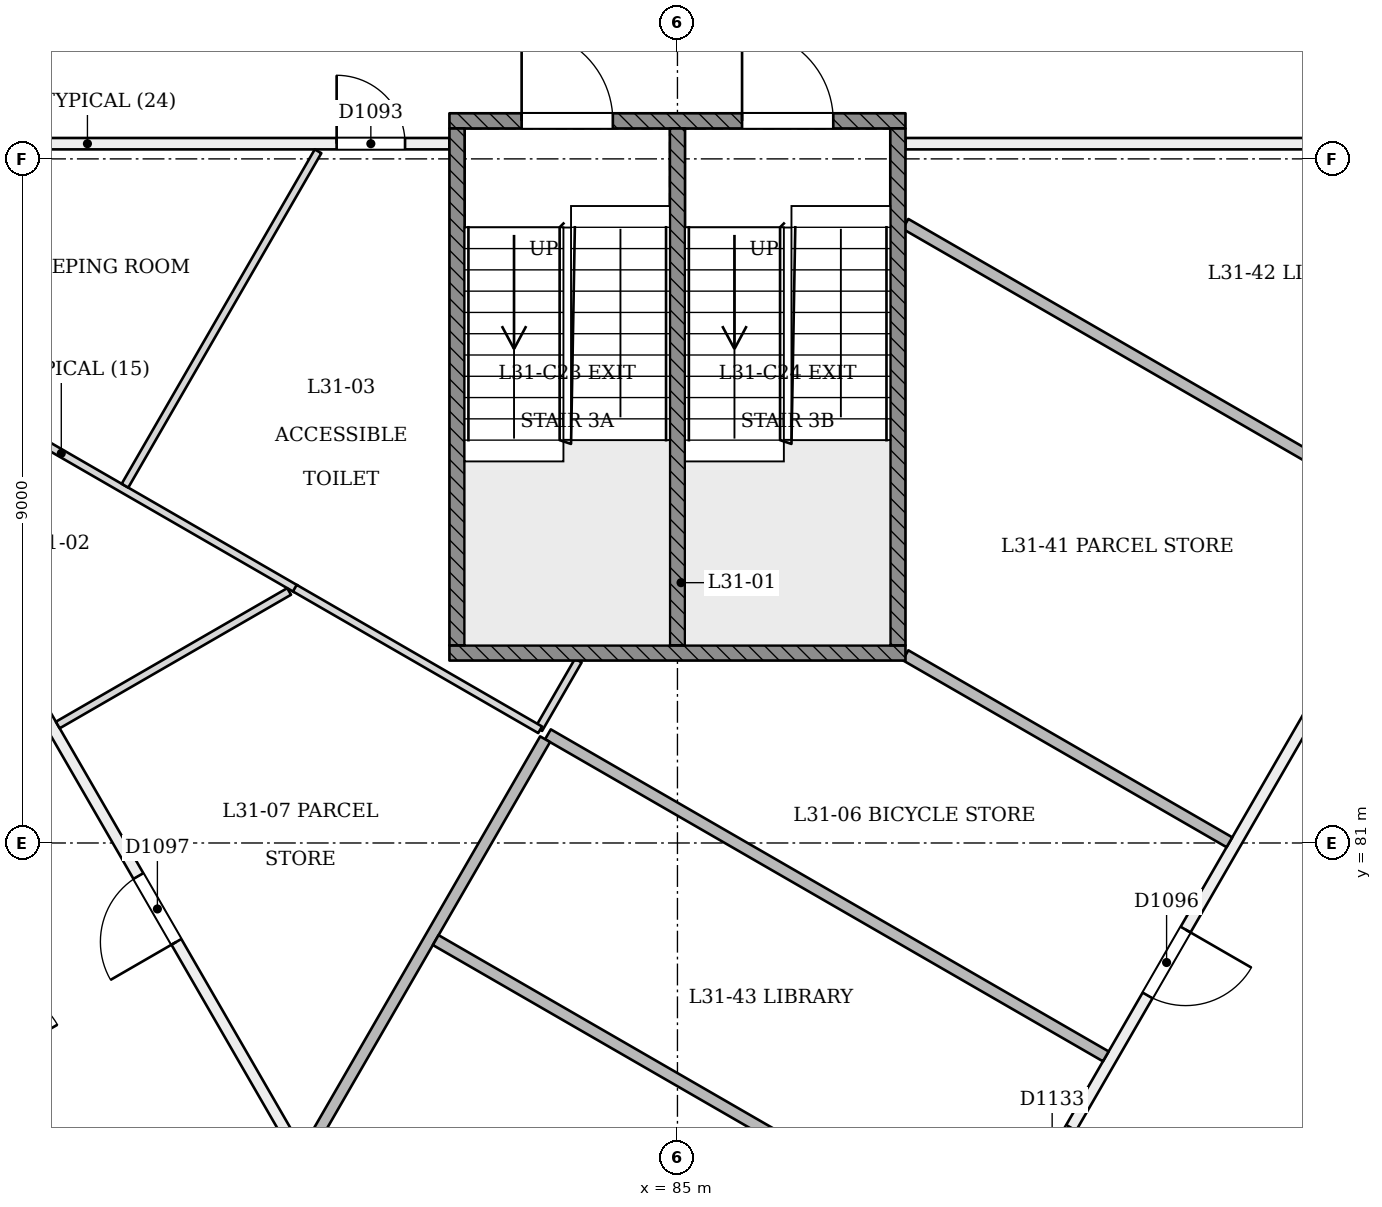
"""IFC4 building model, lengths in metres.
Left out: names, types, materials, properties, quantities, classifications, styles, units other than length and angle.
Written with IfcOpenShell. Run it as: python <this file> out.ifc"""

import sys

from ifc_helpers import new_model, si_unit, direction, frame, frame_2d, origin, place, context, subcontext, project, spatial, rectangle, extrude, element, fill, save


model = new_model("IFC4")
c1 = context("Model", 3, precision=1e-05, world=origin(), true_north=direction((0.0, 1.0)))
c2 = subcontext(c1, "Body", "Model", "MODEL_VIEW")
j1 = project(units=[si_unit("LENGTHUNIT", "METRE"), si_unit("PLANEANGLEUNIT", "RADIAN")], contexts=[c1])
p1 = place(None, origin())
s1 = spatial("IfcSite", under=j1, at=p1, CompositionType="ELEMENT")
p2 = place(p1, origin())
s2 = spatial("IfcBuilding", under=s1, at=p2, CompositionType="ELEMENT")
p3 = place(p2, frame((0.0, 0.0, 124.2)))
s3 = spatial("IfcBuildingStorey", under=s2, at=p3, CompositionType="ELEMENT", Elevation=124.2)
p4 = place(p3, frame((72.475, 90.2, 0.0), z_axis=(0.0, 0.0, 1.0), x_axis=(1.0, 0.0, 0.0)))
e1 = element("IfcWall", 1, at=p4, inside=s3, PredefinedType="PARTITIONING", context=c2, shape_type="SweptSolid", body=[
    extrude(rectangle(XDim=9.525, YDim=0.15, at=frame_2d((4.762, 0.0))), origin(), (0.0, 0.0, 1.0), 3.15),
])
p5 = place(p4, frame((8.041, 0.0, 0.0)))
e2 = element("IfcOpeningElement", 2, at=p5, cuts=e1, PredefinedType="OPENING", context=c2, shape_type="SweptSolid", body=[
    extrude(rectangle(XDim=0.9, YDim=2.1, at=frame_2d((0.45, 1.05))), frame((0.0, 0.085, 0.0), z_axis=(0.0, -1.0, 0.0), x_axis=(1.0, 0.0, 0.0)), (0.0, 0.0, 1.0), 0.171),
])
p6 = place(p3, frame((85.0, 68.281, 0.0), z_axis=(0.0, 0.0, 1.0), x_axis=(-0.49999744999, 0.866026876029, 0.0)))
e3 = element("IfcWall", 3, at=p6, inside=s3, PredefinedType="PARTITIONING", context=c2, shape_type="SweptSolid", body=[
    extrude(rectangle(XDim=25.309, YDim=0.15, at=frame_2d((12.655, 0.0))), origin(), (0.0, 0.0, 1.0), 3.15),
])
p7 = place(p6, frame((18.107, 0.0, 0.0)))
e4 = element("IfcOpeningElement", 4, at=p7, cuts=e3, PredefinedType="OPENING", context=c2, shape_type="SweptSolid", body=[
    extrude(rectangle(XDim=0.9, YDim=2.1, at=frame_2d((0.45, 1.05))), frame((0.0, 0.085, 0.0), z_axis=(0.0, -1.0, 0.0), x_axis=(1.0, 0.0, 0.0)), (0.0, 0.0, 1.0), 0.171),
])
p8 = place(p6, frame((22.843, 0.0, 0.0)))
e5 = element("IfcOpeningElement", 5, at=p8, cuts=e3, PredefinedType="OPENING", context=c2, shape_type="SweptSolid", body=[
    extrude(rectangle(XDim=1.0, YDim=2.1, at=frame_2d((0.5, 1.05))), frame((0.0, 0.085, 0.0), z_axis=(0.0, -1.0, 0.0), x_axis=(1.0, 0.0, 0.0)), (0.0, 0.0, 1.0), 0.171),
])
p9 = place(p6, frame((3.844, 0.0, 0.0)))
e6 = element("IfcOpeningElement", 6, at=p9, cuts=e3, PredefinedType="OPENING", context=c2, shape_type="SweptSolid", body=[
    extrude(rectangle(XDim=1.0, YDim=2.1, at=frame_2d((0.5, 1.05))), frame((0.0, 0.085, 0.0), z_axis=(0.0, -1.0, 0.0), x_axis=(1.0, 0.0, 0.0)), (0.0, 0.0, 1.0), 0.171),
])
p10 = place(p6, frame((13.184, 0.0, 0.0)))
e7 = element("IfcOpeningElement", 7, at=p10, cuts=e3, PredefinedType="OPENING", context=c2, shape_type="SweptSolid", body=[
    extrude(rectangle(XDim=1.0, YDim=2.1, at=frame_2d((0.5, 1.05))), frame((0.0, 0.085, 0.0), z_axis=(0.0, -1.0, 0.0), x_axis=(1.0, 0.0, 0.0)), (0.0, 0.0, 1.0), 0.171),
])
p11 = place(p3, frame((97.655, 90.2, 0.0), z_axis=(0.0, 0.0, 1.0), x_axis=(-0.5000058613, -0.866022019735, 0.0)))
e8 = element("IfcWall", 8, at=p11, inside=s3, PredefinedType="PARTITIONING", context=c2, shape_type="SweptSolid", body=[
    extrude(rectangle(XDim=25.179, YDim=0.15, at=frame_2d((12.59, 0.0))), origin(), (0.0, 0.0, 1.0), 3.15),
])
p12 = place(p11, frame((11.939, 0.0, 0.0)))
e9 = element("IfcOpeningElement", 9, at=p12, cuts=e8, PredefinedType="OPENING", context=c2, shape_type="SweptSolid", body=[
    extrude(rectangle(XDim=1.0, YDim=2.1, at=frame_2d((0.5, 1.05))), frame((0.0, 0.085, 0.0), z_axis=(0.0, -1.0, 0.0), x_axis=(1.0, 0.0, 0.0)), (0.0, 0.0, 1.0), 0.171),
])
p13 = place(p11, frame((7.517, 0.0, 0.0)))
e10 = element("IfcOpeningElement", 10, at=p13, cuts=e8, PredefinedType="OPENING", context=c2, shape_type="SweptSolid", body=[
    extrude(rectangle(XDim=1.0, YDim=2.1, at=frame_2d((0.5, 1.05))), frame((0.0, 0.085, 0.0), z_axis=(0.0, -1.0, 0.0), x_axis=(1.0, 0.0, 0.0)), (0.0, 0.0, 1.0), 0.171),
])
p14 = place(p11, frame((3.271, 0.0, 0.0)))
e11 = element("IfcOpeningElement", 11, at=p14, cuts=e8, PredefinedType="OPENING", context=c2, shape_type="SweptSolid", body=[
    extrude(rectangle(XDim=1.0, YDim=2.1, at=frame_2d((0.5, 1.05))), frame((0.0, 0.085, 0.0), z_axis=(0.0, -1.0, 0.0), x_axis=(1.0, 0.0, 0.0)), (0.0, 0.0, 1.0), 0.171),
])
p15 = place(p11, frame((14.95, 0.0, 0.0)))
e12 = element("IfcOpeningElement", 12, at=p15, cuts=e8, PredefinedType="OPENING", context=c2, shape_type="SweptSolid", body=[
    extrude(rectangle(XDim=1.0, YDim=2.1, at=frame_2d((0.5, 1.05))), frame((0.0, 0.085, 0.0), z_axis=(0.0, -1.0, 0.0), x_axis=(1.0, 0.0, 0.0)), (0.0, 0.0, 1.0), 0.171),
])
p16 = place(p11, frame((18.033, 0.0, 0.0)))
e13 = element("IfcOpeningElement", 13, at=p16, cuts=e8, PredefinedType="OPENING", context=c2, shape_type="SweptSolid", body=[
    extrude(rectangle(XDim=1.0, YDim=2.1, at=frame_2d((0.5, 1.05))), frame((0.0, 0.085, 0.0), z_axis=(0.0, -1.0, 0.0), x_axis=(1.0, 0.0, 0.0)), (0.0, 0.0, 1.0), 0.171),
])
p17 = place(p3, frame((64.413, 98.139, 0.0), z_axis=(0.0, 0.0, 1.0), x_axis=(0.500003831119, -0.866023191876, 0.0)))
e14 = element("IfcWall", 14, at=p17, inside=s3, PredefinedType="PARTITIONING", context=c2, shape_type="SweptSolid", body=[
    extrude(rectangle(XDim=40.758, YDim=0.15, at=frame_2d((20.379, 0.0))), origin(), (0.0, 0.0, 1.0), 2.75),
])
p18 = place(p17, frame((0.2, 0.0, 0.0)))
e15 = element("IfcOpeningElement", 15, at=p18, cuts=e14, PredefinedType="OPENING", context=c2, shape_type="SweptSolid", body=[
    extrude(rectangle(XDim=1.2, YDim=2.1, at=frame_2d((0.6, 1.05))), frame((0.0, 0.085, 0.0), z_axis=(0.0, -1.0, 0.0), x_axis=(1.0, 0.0, 0.0)), (0.0, 0.0, 1.0), 0.171),
])
p19 = place(p17, frame((3.099, 0.0, 0.0)))
e16 = element("IfcOpeningElement", 16, at=p19, cuts=e14, PredefinedType="OPENING", context=c2, shape_type="SweptSolid", body=[
    extrude(rectangle(XDim=1.0, YDim=2.1, at=frame_2d((0.5, 1.05))), frame((0.0, 0.085, 0.0), z_axis=(0.0, -1.0, 0.0), x_axis=(1.0, 0.0, 0.0)), (0.0, 0.0, 1.0), 0.171),
])
p20 = place(p17, frame((9.774, 0.0, 0.0)))
e17 = element("IfcOpeningElement", 17, at=p20, cuts=e14, PredefinedType="OPENING", context=c2, shape_type="SweptSolid", body=[
    extrude(rectangle(XDim=1.0, YDim=2.1, at=frame_2d((0.5, 1.05))), frame((0.0, 0.085, 0.0), z_axis=(0.0, -1.0, 0.0), x_axis=(1.0, 0.0, 0.0)), (0.0, 0.0, 1.0), 0.171),
])
p21 = place(p17, frame((11.984, 0.0, 0.0)))
e18 = element("IfcOpeningElement", 18, at=p21, cuts=e14, PredefinedType="OPENING", context=c2, shape_type="SweptSolid", body=[
    extrude(rectangle(XDim=1.0, YDim=2.1, at=frame_2d((0.5, 1.05))), frame((0.0, 0.085, 0.0), z_axis=(0.0, -1.0, 0.0), x_axis=(1.0, 0.0, 0.0)), (0.0, 0.0, 1.0), 0.171),
])
p22 = place(p17, frame((18.659, 0.0, 0.0)))
e19 = element("IfcOpeningElement", 19, at=p22, cuts=e14, PredefinedType="OPENING", context=c2, shape_type="SweptSolid", body=[
    extrude(rectangle(XDim=1.0, YDim=2.1, at=frame_2d((0.5, 1.05))), frame((0.0, 0.085, 0.0), z_axis=(0.0, -1.0, 0.0), x_axis=(1.0, 0.0, 0.0)), (0.0, 0.0, 1.0), 0.171),
])
p23 = place(p17, frame((22.129, 0.0, 0.0)))
e20 = element("IfcOpeningElement", 20, at=p23, cuts=e14, PredefinedType="OPENING", context=c2, shape_type="SweptSolid", body=[
    extrude(rectangle(XDim=1.0, YDim=2.1, at=frame_2d((0.5, 1.05))), frame((0.0, 0.085, 0.0), z_axis=(0.0, -1.0, 0.0), x_axis=(1.0, 0.0, 0.0)), (0.0, 0.0, 1.0), 0.171),
])
p24 = place(p17, frame((27.659, 0.0, 0.0)))
e21 = element("IfcOpeningElement", 21, at=p24, cuts=e14, PredefinedType="OPENING", context=c2, shape_type="SweptSolid", body=[
    extrude(rectangle(XDim=1.0, YDim=2.1, at=frame_2d((0.5, 1.05))), frame((0.0, 0.085, 0.0), z_axis=(0.0, -1.0, 0.0), x_axis=(1.0, 0.0, 0.0)), (0.0, 0.0, 1.0), 0.171),
])
p25 = place(p17, frame((31.129, 0.0, 0.0)))
e22 = element("IfcOpeningElement", 22, at=p25, cuts=e14, PredefinedType="OPENING", context=c2, shape_type="SweptSolid", body=[
    extrude(rectangle(XDim=1.0, YDim=2.1, at=frame_2d((0.5, 1.05))), frame((0.0, 0.085, 0.0), z_axis=(0.0, -1.0, 0.0), x_axis=(1.0, 0.0, 0.0)), (0.0, 0.0, 1.0), 0.171),
])
p26 = place(p17, frame((36.659, 0.0, 0.0)))
e23 = element("IfcOpeningElement", 23, at=p26, cuts=e14, PredefinedType="OPENING", context=c2, shape_type="SweptSolid", body=[
    extrude(rectangle(XDim=1.0, YDim=2.1, at=frame_2d((0.5, 1.05))), frame((0.0, 0.085, 0.0), z_axis=(0.0, -1.0, 0.0), x_axis=(1.0, 0.0, 0.0)), (0.0, 0.0, 1.0), 0.171),
])
p27 = place(p17, frame((39.445, 0.0, 0.0)))
e24 = element("IfcOpeningElement", 24, at=p27, cuts=e14, PredefinedType="OPENING", context=c2, shape_type="SweptSolid", body=[
    extrude(rectangle(XDim=1.0, YDim=2.1, at=frame_2d((0.5, 1.05))), frame((0.0, 0.085, 0.0), z_axis=(0.0, -1.0, 0.0), x_axis=(1.0, 0.0, 0.0)), (0.0, 0.0, 1.0), 0.171),
])
p28 = place(p3, frame((85.208, 62.842, 0.0), z_axis=(0.0, 0.0, 1.0), x_axis=(0.499999338616, 0.866025785634, 0.0)))
e25 = element("IfcWall", 25, at=p28, inside=s3, PredefinedType="PARTITIONING", context=c2, shape_type="SweptSolid", body=[
    extrude(rectangle(XDim=40.758, YDim=0.15, at=frame_2d((20.379, 0.0))), origin(), (0.0, 0.0, 1.0), 2.75),
])
p29 = place(p28, frame((0.295, 0.0, 0.0)))
e26 = element("IfcOpeningElement", 26, at=p29, cuts=e25, PredefinedType="OPENING", context=c2, shape_type="SweptSolid", body=[
    extrude(rectangle(XDim=1.2, YDim=2.1, at=frame_2d((0.6, 1.05))), frame((0.0, 0.085, 0.0), z_axis=(0.0, -1.0, 0.0), x_axis=(1.0, 0.0, 0.0)), (0.0, 0.0, 1.0), 0.171),
])
p30 = place(p28, frame((4.129, 0.0, 0.0)))
e27 = element("IfcOpeningElement", 27, at=p30, cuts=e25, PredefinedType="OPENING", context=c2, shape_type="SweptSolid", body=[
    extrude(rectangle(XDim=1.0, YDim=2.1, at=frame_2d((0.5, 1.05))), frame((0.0, 0.085, 0.0), z_axis=(0.0, -1.0, 0.0), x_axis=(1.0, 0.0, 0.0)), (0.0, 0.0, 1.0), 0.171),
])
p31 = place(p28, frame((9.659, 0.0, 0.0)))
e28 = element("IfcOpeningElement", 28, at=p31, cuts=e25, PredefinedType="OPENING", context=c2, shape_type="SweptSolid", body=[
    extrude(rectangle(XDim=1.0, YDim=2.1, at=frame_2d((0.5, 1.05))), frame((0.0, 0.085, 0.0), z_axis=(0.0, -1.0, 0.0), x_axis=(1.0, 0.0, 0.0)), (0.0, 0.0, 1.0), 0.171),
])
p32 = place(p28, frame((11.984, 0.0, 0.0)))
e29 = element("IfcOpeningElement", 29, at=p32, cuts=e25, PredefinedType="OPENING", context=c2, shape_type="SweptSolid", body=[
    extrude(rectangle(XDim=1.0, YDim=2.1, at=frame_2d((0.5, 1.05))), frame((0.0, 0.085, 0.0), z_axis=(0.0, -1.0, 0.0), x_axis=(1.0, 0.0, 0.0)), (0.0, 0.0, 1.0), 0.171),
])
p33 = place(p28, frame((18.774, 0.0, 0.0)))
e30 = element("IfcOpeningElement", 30, at=p33, cuts=e25, PredefinedType="OPENING", context=c2, shape_type="SweptSolid", body=[
    extrude(rectangle(XDim=1.0, YDim=2.1, at=frame_2d((0.5, 1.05))), frame((0.0, 0.085, 0.0), z_axis=(0.0, -1.0, 0.0), x_axis=(1.0, 0.0, 0.0)), (0.0, 0.0, 1.0), 0.171),
])
p34 = place(p28, frame((21.099, 0.0, 0.0)))
e31 = element("IfcOpeningElement", 31, at=p34, cuts=e25, PredefinedType="OPENING", context=c2, shape_type="SweptSolid", body=[
    extrude(rectangle(XDim=1.0, YDim=2.1, at=frame_2d((0.5, 1.05))), frame((0.0, 0.085, 0.0), z_axis=(0.0, -1.0, 0.0), x_axis=(1.0, 0.0, 0.0)), (0.0, 0.0, 1.0), 0.171),
])
p35 = place(p28, frame((27.659, 0.0, 0.0)))
e32 = element("IfcOpeningElement", 32, at=p35, cuts=e25, PredefinedType="OPENING", context=c2, shape_type="SweptSolid", body=[
    extrude(rectangle(XDim=1.0, YDim=2.1, at=frame_2d((0.5, 1.05))), frame((0.0, 0.085, 0.0), z_axis=(0.0, -1.0, 0.0), x_axis=(1.0, 0.0, 0.0)), (0.0, 0.0, 1.0), 0.171),
])
p36 = place(p28, frame((30.099, 0.0, 0.0)))
e33 = element("IfcOpeningElement", 33, at=p36, cuts=e25, PredefinedType="OPENING", context=c2, shape_type="SweptSolid", body=[
    extrude(rectangle(XDim=1.0, YDim=2.1, at=frame_2d((0.5, 1.05))), frame((0.0, 0.085, 0.0), z_axis=(0.0, -1.0, 0.0), x_axis=(1.0, 0.0, 0.0)), (0.0, 0.0, 1.0), 0.171),
])
p37 = place(p28, frame((39.358, 0.0, 0.0)))
e34 = element("IfcOpeningElement", 34, at=p37, cuts=e25, PredefinedType="OPENING", context=c2, shape_type="SweptSolid", body=[
    extrude(rectangle(XDim=1.2, YDim=2.1, at=frame_2d((0.6, 1.05))), frame((0.0, 0.085, 0.0), z_axis=(0.0, -1.0, 0.0), x_axis=(1.0, 0.0, 0.0)), (0.0, 0.0, 1.0), 0.171),
])
p38 = place(p3, frame((88.0, 90.2, 0.0), z_axis=(0.0, 0.0, 1.0), x_axis=(1.0, 0.0, 0.0)))
e35 = element("IfcWall", 35, at=p38, inside=s3, PredefinedType="PARTITIONING", context=c2, shape_type="SweptSolid", body=[
    extrude(rectangle(XDim=9.525, YDim=0.15, at=frame_2d((4.762, 0.0))), origin(), (0.0, 0.0, 1.0), 3.15),
])
p39 = place(p3, frame((79.983, 84.343, 0.0), z_axis=(0.0, 0.0, 1.0), x_axis=(-0.866015220358, 0.500017637798, 0.0)))
e36 = element("IfcWall", 36, at=p39, inside=s3, PredefinedType="PARTITIONING", context=c2, shape_type="SweptSolid", body=[
    extrude(rectangle(XDim=7.135, YDim=0.1, at=frame_2d((3.568, 0.0))), origin(), (0.0, 0.0, 1.0), 3.15),
])
p40 = place(p3, frame((76.847, 82.552, 0.0), z_axis=(0.0, 0.0, 1.0), x_axis=(0.866020164116, 0.500009075263, 0.0)))
e37 = element("IfcWall", 37, at=p40, inside=s3, PredefinedType="PARTITIONING", context=c2, shape_type="SweptSolid", body=[
    extrude(rectangle(XDim=3.515, YDim=0.1, at=frame_2d((1.757, 0.0))), origin(), (0.0, 0.0, 1.0), 3.15),
])
p41 = place(p3, frame((80.272, 90.1, 0.0), z_axis=(0.0, 0.0, 1.0), x_axis=(-0.499984530349, -0.866034335007, 0.0)))
e38 = element("IfcWall", 38, at=p41, inside=s3, PredefinedType="PARTITIONING", context=c2, shape_type="SweptSolid", body=[
    extrude(rectangle(XDim=5.08, YDim=0.1, at=frame_2d((2.54, 0.0))), origin(), (0.0, 0.0, 1.0), 3.15),
])
p42 = place(p3, frame((83.176, 82.5, 0.0), z_axis=(0.0, 0.0, 1.0), x_axis=(0.499952834948, 0.866052632827, 0.0)))
e39 = element("IfcWall", 39, at=p42, inside=s3, PredefinedType="PARTITIONING", context=c2, shape_type="SweptSolid", body=[
    extrude(rectangle(XDim=1.04, YDim=0.1, at=frame_2d((0.52, 0.0))), origin(), (0.0, 0.0, 1.0), 3.15),
])
p43 = place(p3, frame((79.966, 84.353, 0.0), z_axis=(0.0, 0.0, 1.0), x_axis=(0.866037201768, -0.499979564737, 0.0)))
e40 = element("IfcWall", 40, at=p43, inside=s3, PredefinedType="PARTITIONING", context=c2, shape_type="SweptSolid", body=[
    extrude(rectangle(XDim=3.726, YDim=0.1, at=frame_2d((1.863, 0.0))), origin(), (0.0, 0.0, 1.0), 3.15),
])
p44 = place(p3, frame((92.262, 81.01, 0.0), z_axis=(0.0, 0.0, 1.0), x_axis=(-0.866021185894, 0.500007305529, 0.0)))
e41 = element("IfcWall", 41, at=p44, inside=s3, PredefinedType="PARTITIONING", context=c2, shape_type="SweptSolid", body=[
    extrude(rectangle(XDim=4.921, YDim=0.15, at=frame_2d((2.461, 0.0))), origin(), (0.0, 0.0, 1.0), 3.15),
])
p45 = place(p3, frame((83.296, 82.43, 0.0), z_axis=(0.0, 0.0, 1.0), x_axis=(0.866029193349, -0.499993436224, 0.0)))
e42 = element("IfcWall", 42, at=p45, inside=s3, PredefinedType="PARTITIONING", context=c2, shape_type="SweptSolid", body=[
    extrude(rectangle(XDim=8.475, YDim=0.15, at=frame_2d((4.237, 0.0))), origin(), (0.0, 0.0, 1.0), 3.15),
])
p46 = place(p3, frame((80.251, 77.155, 0.0), z_axis=(0.0, 0.0, 1.0), x_axis=(0.500028081597, 0.86600919026, 0.0)))
e43 = element("IfcWall", 43, at=p46, inside=s3, PredefinedType="PARTITIONING", context=c2, shape_type="SweptSolid", body=[
    extrude(rectangle(XDim=6.016, YDim=0.15, at=frame_2d((3.008, 0.0))), origin(), (0.0, 0.0, 1.0), 3.15),
])
p47 = place(p3, frame((94.719, 85.265, 0.0), z_axis=(0.0, 0.0, 1.0), x_axis=(-0.866015276346, 0.500017540828, 0.0)))
e44 = element("IfcWall", 44, at=p47, inside=s3, PredefinedType="PARTITIONING", context=c2, shape_type="SweptSolid", body=[
    extrude(rectangle(XDim=7.759, YDim=0.15, at=frame_2d((3.879, 0.0))), origin(), (0.0, 0.0, 1.0), 3.15),
])
p48 = place(p3, frame((81.82, 79.723, 0.0), z_axis=(0.0, 0.0, 1.0), x_axis=(0.866021988312, -0.500005915725, 0.0)))
e45 = element("IfcWall", 45, at=p48, inside=s3, PredefinedType="PARTITIONING", context=c2, shape_type="SweptSolid", body=[
    extrude(rectangle(XDim=8.4, YDim=0.15, at=frame_2d((4.2, 0.0))), origin(), (0.0, 0.0, 1.0), 3.15),
])
p49 = place(p3, frame((82.0, 90.5, 0.0), z_axis=(0.0, 0.0, 1.0), x_axis=(1.0, 0.0, 0.0)))
e46 = element("IfcWall", 46, at=p49, inside=s3, PredefinedType="SOLIDWALL", context=c2, shape_type="SweptSolid", body=[
    extrude(rectangle(XDim=6.0, YDim=0.2, at=frame_2d((3.0, 0.0))), origin(), (0.0, 0.0, 1.0), 3.15),
])
p50 = place(p49, frame((0.95, 0.0, 0.0)))
e47 = element("IfcOpeningElement", 47, at=p50, cuts=e46, PredefinedType="OPENING", context=c2, shape_type="SweptSolid", body=[
    extrude(rectangle(XDim=1.2, YDim=2.1, at=frame_2d((0.6, 1.05))), frame((0.0, 0.11, 0.0), z_axis=(0.0, -1.0, 0.0), x_axis=(1.0, 0.0, 0.0)), (0.0, 0.0, 1.0), 0.221),
])
p51 = place(p49, frame((3.85, 0.0, 0.0)))
e48 = element("IfcOpeningElement", 48, at=p51, cuts=e46, PredefinedType="OPENING", context=c2, shape_type="SweptSolid", body=[
    extrude(rectangle(XDim=1.2, YDim=2.1, at=frame_2d((0.6, 1.05))), frame((0.0, 0.11, 0.0), z_axis=(0.0, -1.0, 0.0), x_axis=(1.0, 0.0, 0.0)), (0.0, 0.0, 1.0), 0.221),
])
p52 = place(p3, frame((82.0, 83.5, 0.0), z_axis=(0.0, 0.0, 1.0), x_axis=(1.0, 0.0, 0.0)))
e49 = element("IfcWall", 49, at=p52, inside=s3, PredefinedType="SOLIDWALL", context=c2, shape_type="SweptSolid", body=[
    extrude(rectangle(XDim=6.0, YDim=0.2, at=frame_2d((3.0, 0.0))), origin(), (0.0, 0.0, 1.0), 3.15),
])
for number, where, z_axis, x_axis in (
    (50, (82.1, 83.6, 0.0), (0.0, 0.0, 1.0), (0.0, 1.0, 0.0)),
    (51, (87.9, 83.6, 0.0), (0.0, 0.0, 1.0), (0.0, 1.0, 0.0)),
    (52, (85.0, 83.6, 0.0), (0.0, 0.0, 1.0), (0.0, 1.0, 0.0)),
):
    element("IfcWall", number, at=place(p3, frame(where, z_axis=z_axis, x_axis=x_axis)), inside=s3, PredefinedType="SOLIDWALL", context=c2, shape_type="SweptSolid", body=[
        extrude(rectangle(XDim=6.8, YDim=0.2, at=frame_2d((3.4, 0.0))), origin(), (0.0, 0.0, 1.0), 3.15),
    ])
p53 = place(p5, origin())
e53 = element("IfcDoor", 53, at=p53, inside=s3, OperationType="SINGLE_SWING_LEFT", PredefinedType="NOTDEFINED", context=c2, shape_type="SweptSolid", body=[
    extrude(rectangle(XDim=0.9, YDim=2.1, at=frame_2d((0.45, 1.05))), frame((0.0, 0.025, 0.0), z_axis=(0.0, -1.0, 0.0), x_axis=(1.0, 0.0, 0.0)), (0.0, 0.0, 1.0), 0.05),
])
fill(e2, e53)
p54 = place(p12, origin())
e54 = element("IfcDoor", 54, at=p54, inside=s3, OperationType="SINGLE_SWING_LEFT", PredefinedType="NOTDEFINED", context=c2, shape_type="SweptSolid", body=[
    extrude(rectangle(XDim=1.0, YDim=2.1, at=frame_2d((0.5, 1.05))), frame((0.0, 0.025, 0.0), z_axis=(0.0, -1.0, 0.0), x_axis=(1.0, 0.0, 0.0)), (0.0, 0.0, 1.0), 0.05),
])
fill(e9, e54)
p55 = place(p10, origin())
e55 = element("IfcDoor", 55, at=p55, inside=s3, OperationType="SINGLE_SWING_LEFT", PredefinedType="NOTDEFINED", context=c2, shape_type="SweptSolid", body=[
    extrude(rectangle(XDim=1.0, YDim=2.1, at=frame_2d((0.5, 1.05))), frame((0.0, 0.025, 0.0), z_axis=(0.0, -1.0, 0.0), x_axis=(1.0, 0.0, 0.0)), (0.0, 0.0, 1.0), 0.05),
])
fill(e7, e55)
p56 = place(p15, origin())
e56 = element("IfcDoor", 56, at=p56, inside=s3, OperationType="SINGLE_SWING_RIGHT", PredefinedType="NOTDEFINED", context=c2, shape_type="SweptSolid", body=[
    extrude(rectangle(XDim=1.0, YDim=2.1, at=frame_2d((0.5, 1.05))), frame((0.0, 0.025, 0.0), z_axis=(0.0, -1.0, 0.0), x_axis=(1.0, 0.0, 0.0)), (0.0, 0.0, 1.0), 0.05),
])
fill(e12, e56)
p57 = place(p50, origin())
e57 = element("IfcDoor", 57, at=p57, inside=s3, OperationType="SINGLE_SWING_LEFT", PredefinedType="NOTDEFINED", context=c2, shape_type="SweptSolid", body=[
    extrude(rectangle(XDim=1.2, YDim=2.1, at=frame_2d((0.6, 1.05))), frame((0.0, 0.025, 0.0), z_axis=(0.0, -1.0, 0.0), x_axis=(1.0, 0.0, 0.0)), (0.0, 0.0, 1.0), 0.05),
])
fill(e47, e57)
p58 = place(p51, origin())
e58 = element("IfcDoor", 58, at=p58, inside=s3, OperationType="SINGLE_SWING_LEFT", PredefinedType="NOTDEFINED", context=c2, shape_type="SweptSolid", body=[
    extrude(rectangle(XDim=1.2, YDim=2.1, at=frame_2d((0.6, 1.05))), frame((0.0, 0.025, 0.0), z_axis=(0.0, -1.0, 0.0), x_axis=(1.0, 0.0, 0.0)), (0.0, 0.0, 1.0), 0.05),
])
fill(e48, e58)
save(model, sys.argv[1])
